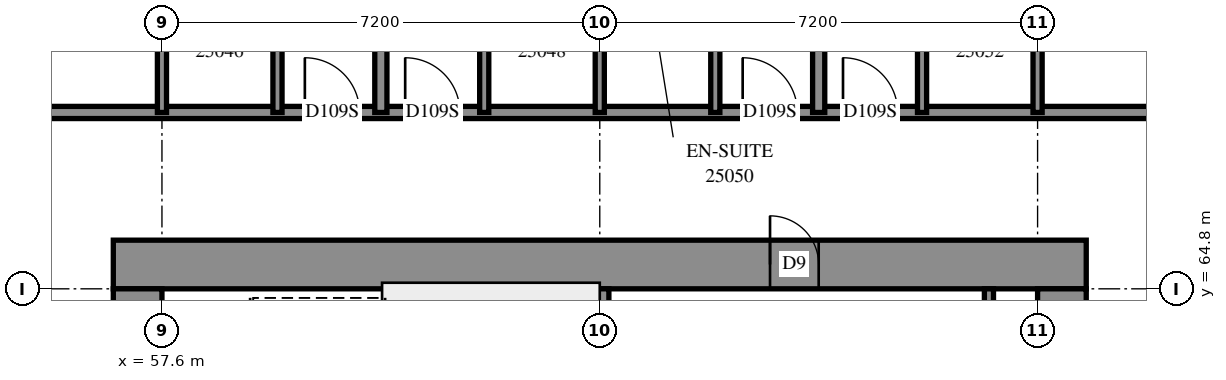
"""IFC4 building model, lengths in metres.
Left out: names, types, materials, properties, quantities, classifications, styles, units other than length and angle.
Written with IfcOpenShell. Run it as: python <this file> out.ifc"""

import sys

from ifc_helpers import new_model, si_unit, direction, frame, frame_2d, origin, place, context, subcontext, project, spatial, rectangle, extrude, element, fill, save


model = new_model("IFC4")
c1 = context("Model", 3, precision=1e-05, world=origin(), true_north=direction((0.0, 1.0)))
c2 = subcontext(c1, "Body", "Model", "MODEL_VIEW")
j1 = project(units=[si_unit("LENGTHUNIT", "METRE"), si_unit("PLANEANGLEUNIT", "RADIAN")], contexts=[c1])
p1 = place(None, origin())
s1 = spatial("IfcSite", under=j1, at=p1, CompositionType="ELEMENT")
p2 = place(p1, origin())
s2 = spatial("IfcBuilding", under=s1, at=p2, CompositionType="ELEMENT")
p3 = place(p2, frame((0.0, 0.0, 94.8)))
s3 = spatial("IfcBuildingStorey", under=s2, at=p3, CompositionType="ELEMENT", Elevation=94.8)
p4 = place(p3, frame((56.8, 65.2, -0.3), z_axis=(0.0, 0.0, 1.0), x_axis=(1.0, 0.0, 0.0)))
e1 = element("IfcWall", 1, at=p4, inside=s3, PredefinedType="SHEAR", context=c2, shape_type="SweptSolid", body=[
    extrude(rectangle(XDim=16.0, YDim=0.8, at=frame_2d((8.0, 0.0))), origin(), (0.0, 0.0, 1.0), 2.7),
])
p5 = place(p4, frame((10.8, 0.0, 0.3)))
e2 = element("IfcOpeningElement", 2, at=p5, cuts=e1, PredefinedType="OPENING", context=c2, shape_type="SweptSolid", body=[
    extrude(rectangle(XDim=0.8, YDim=2.1, at=frame_2d((0.4, 1.05))), frame((0.0, 0.41, 0.0), z_axis=(0.0, -1.0, 0.0), x_axis=(1.0, 0.0, 0.0)), (0.0, 0.0, 1.0), 0.82),
])
p6 = place(p3, frame((57.2, 50.4, -0.3), z_axis=(0.0, 0.0, 1.0), x_axis=(0.0, 1.0, 0.0)))
e3 = element("IfcWall", 3, at=p6, inside=s3, PredefinedType="SHEAR", context=c2, shape_type="SweptSolid", body=[
    extrude(rectangle(XDim=14.4, YDim=0.8, at=frame_2d((7.2, 0.0))), origin(), (0.0, 0.0, 1.0), 2.7),
])
p7 = place(p6, frame((4.55, 0.0, 0.3)))
e4 = element("IfcOpeningElement", 4, at=p7, cuts=e3, PredefinedType="OPENING", context=c2, shape_type="SweptSolid", body=[
    extrude(rectangle(XDim=1.1, YDim=2.1, at=frame_2d((0.55, 1.05))), frame((0.0, 0.41, 0.0), z_axis=(0.0, -1.0, 0.0), x_axis=(1.0, 0.0, 0.0)), (0.0, 0.0, 1.0), 0.82),
])
p8 = place(p6, frame((11.35, 0.0, 0.3)))
e5 = element("IfcOpeningElement", 5, at=p8, cuts=e3, PredefinedType="OPENING", context=c2, shape_type="SweptSolid", body=[
    extrude(rectangle(XDim=1.1, YDim=2.1, at=frame_2d((0.55, 1.05))), frame((0.0, 0.41, 0.0), z_axis=(0.0, -1.0, 0.0), x_axis=(1.0, 0.0, 0.0)), (0.0, 0.0, 1.0), 0.82),
])
p9 = place(p3, frame((72.4, 50.4, -0.3), z_axis=(0.0, 0.0, 1.0), x_axis=(0.0, 1.0, 0.0)))
e6 = element("IfcWall", 6, at=p9, inside=s3, PredefinedType="SHEAR", context=c2, shape_type="SweptSolid", body=[
    extrude(rectangle(XDim=14.4, YDim=0.8, at=frame_2d((7.2, 0.0))), origin(), (0.0, 0.0, 1.0), 2.7),
])
p10 = place(p9, frame((4.55, 0.0, 0.3)))
e7 = element("IfcOpeningElement", 7, at=p10, cuts=e6, PredefinedType="OPENING", context=c2, shape_type="SweptSolid", body=[
    extrude(rectangle(XDim=1.1, YDim=2.1, at=frame_2d((0.55, 1.05))), frame((0.0, 0.41, 0.0), z_axis=(0.0, -1.0, 0.0), x_axis=(1.0, 0.0, 0.0)), (0.0, 0.0, 1.0), 0.82),
])
p11 = place(p9, frame((11.35, 0.0, 0.3)))
e8 = element("IfcOpeningElement", 8, at=p11, cuts=e6, PredefinedType="OPENING", context=c2, shape_type="SweptSolid", body=[
    extrude(rectangle(XDim=1.1, YDim=2.1, at=frame_2d((0.55, 1.05))), frame((0.0, 0.41, 0.0), z_axis=(0.0, -1.0, 0.0), x_axis=(1.0, 0.0, 0.0)), (0.0, 0.0, 1.0), 0.82),
])
p12 = place(p3, frame((64.8, 60.6, 0.0), z_axis=(0.0, 0.0, 1.0), x_axis=(0.0, 1.0, 0.0)))
e9 = element("IfcWall", 9, at=p12, inside=s3, PredefinedType="SOLIDWALL", context=c2, shape_type="SweptSolid", body=[
    extrude(rectangle(XDim=4.2, YDim=0.3, at=frame_2d((2.1, 0.0))), origin(), (0.0, 0.0, 1.0), 3.1),
])
p13 = place(p3, frame((71.2, 63.78, 0.0), z_axis=(0.0, 0.0, 1.0), x_axis=(0.0, 1.0, 0.0)))
e10 = element("IfcWall", 10, at=p13, inside=s3, PredefinedType="PARTITIONING", context=c2, shape_type="SweptSolid", body=[
    extrude(rectangle(XDim=1.02, YDim=0.15, at=frame_2d((0.51, 0.0))), origin(), (0.0, 0.0, 1.0), 3.1),
])
p14 = place(p3, frame((54.7, 67.7, 0.0), z_axis=(0.0, 0.0, 1.0), x_axis=(1.0, 0.0, 0.0)))
e11 = element("IfcWall", 11, at=p14, inside=s3, PredefinedType="PARTITIONING", context=c2, shape_type="SweptSolid", body=[
    extrude(rectangle(XDim=20.2, YDim=0.2, at=frame_2d((10.1, 0.0))), origin(), (0.0, 0.0, 1.0), 3.1),
])
p15 = place(p14, frame((5.25, 0.0, 0.0)))
e12 = element("IfcOpeningElement", 12, at=p15, cuts=e11, PredefinedType="OPENING", context=c2, shape_type="SweptSolid", body=[
    extrude(rectangle(XDim=0.9, YDim=2.1, at=frame_2d((0.45, 1.05))), frame((0.0, 0.11, 0.0), z_axis=(0.0, -1.0, 0.0), x_axis=(1.0, 0.0, 0.0)), (0.0, 0.0, 1.0), 0.22),
])
p16 = place(p14, frame((6.9, 0.0, 0.0)))
e13 = element("IfcOpeningElement", 13, at=p16, cuts=e11, PredefinedType="OPENING", context=c2, shape_type="SweptSolid", body=[
    extrude(rectangle(XDim=0.9, YDim=2.1, at=frame_2d((0.45, 1.05))), frame((0.0, 0.11, 0.0), z_axis=(0.0, -1.0, 0.0), x_axis=(1.0, 0.0, 0.0)), (0.0, 0.0, 1.0), 0.22),
])
p17 = place(p14, frame((12.45, 0.0, 0.0)))
e14 = element("IfcOpeningElement", 14, at=p17, cuts=e11, PredefinedType="OPENING", context=c2, shape_type="SweptSolid", body=[
    extrude(rectangle(XDim=0.9, YDim=2.1, at=frame_2d((0.45, 1.05))), frame((0.0, 0.11, 0.0), z_axis=(0.0, -1.0, 0.0), x_axis=(1.0, 0.0, 0.0)), (0.0, 0.0, 1.0), 0.22),
])
p18 = place(p14, frame((14.1, 0.0, 0.0)))
e15 = element("IfcOpeningElement", 15, at=p18, cuts=e11, PredefinedType="OPENING", context=c2, shape_type="SweptSolid", body=[
    extrude(rectangle(XDim=0.9, YDim=2.1, at=frame_2d((0.45, 1.05))), frame((0.0, 0.11, 0.0), z_axis=(0.0, -1.0, 0.0), x_axis=(1.0, 0.0, 0.0)), (0.0, 0.0, 1.0), 0.22),
])
p19 = place(p3, frame((68.4, 67.7, 0.0), z_axis=(0.0, 0.0, 1.0), x_axis=(0.0, 1.0, 0.0)))
e16 = element("IfcWall", 16, at=p19, inside=s3, PredefinedType="PARTITIONING", context=c2, shape_type="SweptSolid", body=[
    extrude(rectangle(XDim=4.983, YDim=0.2, at=frame_2d((2.492, 0.0))), origin(), (0.0, 0.0, 1.0), 3.1),
])
p20 = place(p3, frame((61.2, 67.7, 0.0), z_axis=(0.0, 0.0, 1.0), x_axis=(0.0, 1.0, 0.0)))
e17 = element("IfcWall", 17, at=p20, inside=s3, PredefinedType="PARTITIONING", context=c2, shape_type="SweptSolid", body=[
    extrude(rectangle(XDim=4.954, YDim=0.2, at=frame_2d((2.477, 0.0))), origin(), (0.0, 0.0, 1.0), 3.1),
])
for number, where, z_axis, x_axis in (
    (18, (59.5, 67.7, 0.0), (0.0, 0.0, 1.0), (0.0, 1.0, 0.0)),
    (19, (57.6, 67.7, 0.0), (0.0, 0.0, 1.0), (0.0, 1.0, 0.0)),
    (20, (62.9, 67.7, 0.0), (0.0, 0.0, 1.0), (0.0, 1.0, 0.0)),
    (21, (64.8, 67.7, 0.0), (0.0, 0.0, 1.0), (0.0, 1.0, 0.0)),
    (22, (66.7, 67.7, 0.0), (0.0, 0.0, 1.0), (0.0, 1.0, 0.0)),
    (23, (70.1, 67.7, 0.0), (0.0, 0.0, 1.0), (0.0, 1.0, 0.0)),
    (24, (72.0, 67.7, 0.0), (0.0, 0.0, 1.0), (0.0, 1.0, 0.0)),
):
    element("IfcWall", number, at=place(p3, frame(where, z_axis=z_axis, x_axis=x_axis)), inside=s3, PredefinedType="PARTITIONING", context=c2, shape_type="SweptSolid", body=[
        extrude(rectangle(XDim=2.4, YDim=0.15, at=frame_2d((1.2, 0.0))), origin(), (0.0, 0.0, 1.0), 3.1),
    ])
p21 = place(p5, origin())
e25 = element("IfcDoor", 25, at=p21, inside=s3, OperationType="SINGLE_SWING_RIGHT", PredefinedType="DOOR", context=c2, shape_type="SweptSolid", body=[
    extrude(rectangle(XDim=0.8, YDim=2.1, at=frame_2d((0.4, 1.05))), frame((0.0, -0.34, 0.0), z_axis=(0.0, -1.0, 0.0), x_axis=(1.0, 0.0, 0.0)), (0.0, 0.0, 1.0), 0.05),
])
fill(e2, e25)
p22 = place(p15, origin())
e26 = element("IfcDoor", 26, at=p22, inside=s3, OperationType="SINGLE_SWING_RIGHT", PredefinedType="DOOR", context=c2, shape_type="SweptSolid", body=[
    extrude(rectangle(XDim=0.9, YDim=2.1, at=frame_2d((0.45, 1.05))), frame((0.0, 0.025, 0.0), z_axis=(0.0, -1.0, 0.0), x_axis=(1.0, 0.0, 0.0)), (0.0, 0.0, 1.0), 0.05),
])
fill(e12, e26)
p23 = place(p16, origin())
e27 = element("IfcDoor", 27, at=p23, inside=s3, OperationType="SINGLE_SWING_LEFT", PredefinedType="DOOR", context=c2, shape_type="SweptSolid", body=[
    extrude(rectangle(XDim=0.9, YDim=2.1, at=frame_2d((0.45, 1.05))), frame((0.0, 0.025, 0.0), z_axis=(0.0, -1.0, 0.0), x_axis=(1.0, 0.0, 0.0)), (0.0, 0.0, 1.0), 0.05),
])
fill(e13, e27)
p24 = place(p17, origin())
e28 = element("IfcDoor", 28, at=p24, inside=s3, OperationType="SINGLE_SWING_RIGHT", PredefinedType="DOOR", context=c2, shape_type="SweptSolid", body=[
    extrude(rectangle(XDim=0.9, YDim=2.1, at=frame_2d((0.45, 1.05))), frame((0.0, 0.025, 0.0), z_axis=(0.0, -1.0, 0.0), x_axis=(1.0, 0.0, 0.0)), (0.0, 0.0, 1.0), 0.05),
])
fill(e14, e28)
p25 = place(p18, origin())
e29 = element("IfcDoor", 29, at=p25, inside=s3, OperationType="SINGLE_SWING_LEFT", PredefinedType="DOOR", context=c2, shape_type="SweptSolid", body=[
    extrude(rectangle(XDim=0.9, YDim=2.1, at=frame_2d((0.45, 1.05))), frame((0.0, 0.025, 0.0), z_axis=(0.0, -1.0, 0.0), x_axis=(1.0, 0.0, 0.0)), (0.0, 0.0, 1.0), 0.05),
])
fill(e15, e29)
save(model, sys.argv[1])
